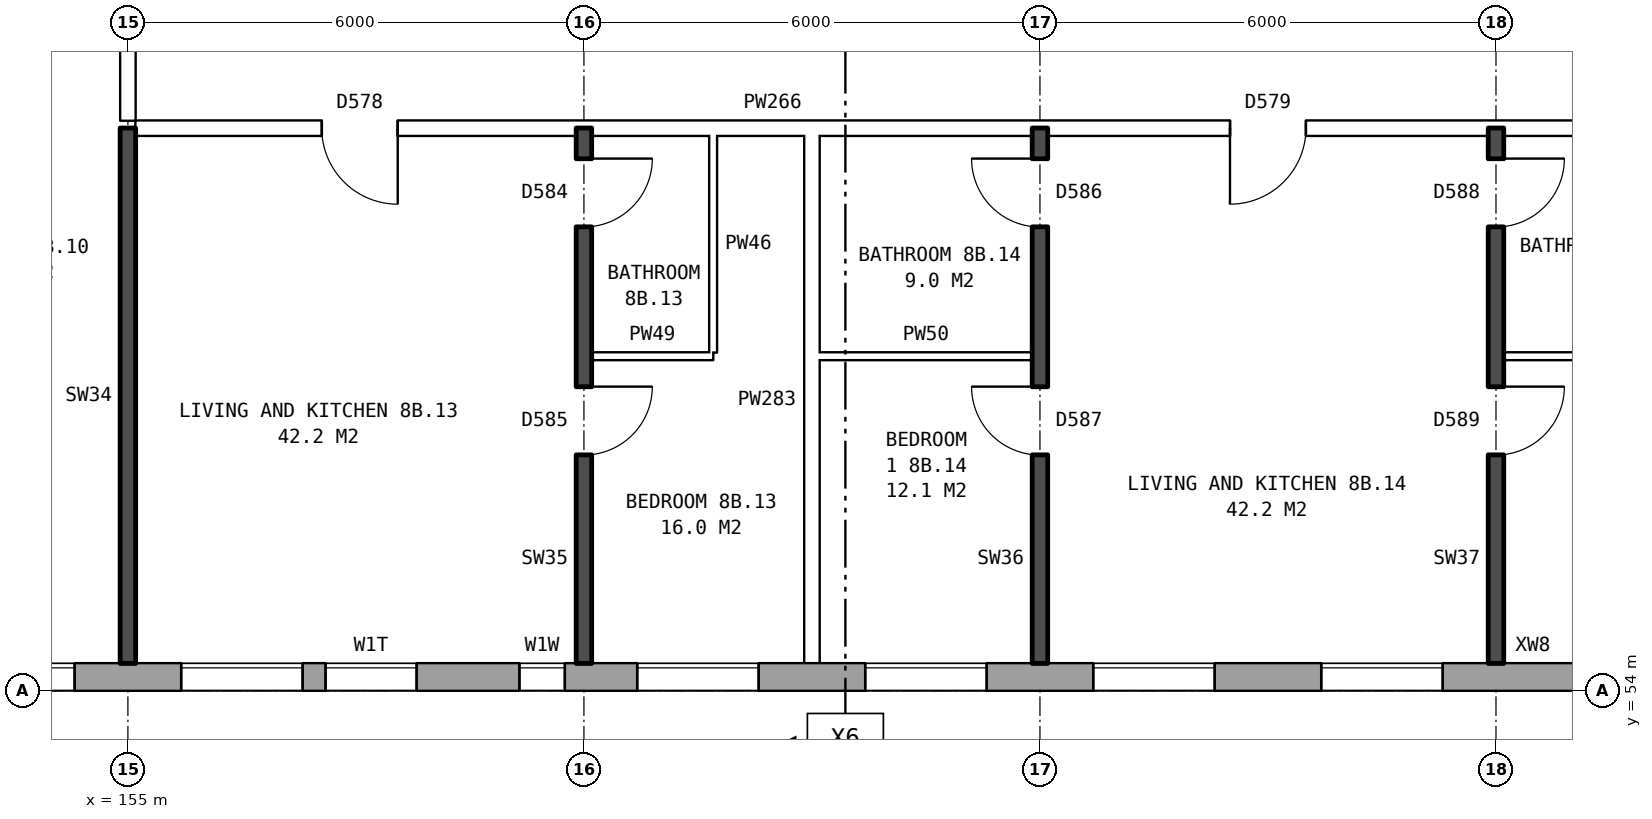
"""IFC4 building model, lengths in metres.
Left out: names, types, materials, properties, quantities, classifications, styles, units other than length and angle.
Written with IfcOpenShell. Run it as: python <this file> out.ifc"""

import sys

from ifc_helpers import new_model, si_unit, direction, frame, frame_2d, origin, place, context, subcontext, project, spatial, rectangle, extrude, element, fill, save


model = new_model("IFC4")
c1 = context("Model", 3, precision=1e-05, world=origin(), true_north=direction((0.0, 1.0)))
c2 = subcontext(c1, "Body", "Model", "MODEL_VIEW")
j1 = project(units=[si_unit("LENGTHUNIT", "METRE"), si_unit("PLANEANGLEUNIT", "RADIAN")], contexts=[c1])
p1 = place(None, origin())
s1 = spatial("IfcSite", under=j1, at=p1, CompositionType="ELEMENT")
p2 = place(p1, origin())
s2 = spatial("IfcBuilding", under=s1, at=p2, CompositionType="ELEMENT")
p3 = place(p2, frame((0.0, 0.0, 31.9)))
s3 = spatial("IfcBuildingStorey", under=s2, at=p3, CompositionType="ELEMENT", Elevation=31.9)
p4 = place(p3, frame((134.075, 54.18, 0.0), z_axis=(0.0, 0.0, 1.0), x_axis=(1.0, 0.0, 0.0)))
e1 = element("IfcWall", 1, at=p4, inside=s3, PredefinedType="STANDARD", context=c2, shape_type="SweptSolid", body=[
    extrude(rectangle(XDim=40.601, YDim=0.36, at=frame_2d((20.3, 0.0))), origin(), (0.0, 0.0, 1.0), 2.85),
])
p5 = place(p4, frame((0.625, 0.0, 0.8)))
e2 = element("IfcOpeningElement", 2, at=p5, cuts=e1, PredefinedType="OPENING", context=c2, shape_type="SweptSolid", body=[
    extrude(rectangle(XDim=1.6, YDim=1.8, at=frame_2d((0.8, 0.9))), frame((0.0, 0.19, 0.0), z_axis=(0.0, -1.0, 0.0), x_axis=(1.0, 0.0, 0.0)), (0.0, 0.0, 1.0), 0.38),
])
p6 = place(p4, frame((3.625, 0.0, 0.8)))
e3 = element("IfcOpeningElement", 3, at=p6, cuts=e1, PredefinedType="OPENING", context=c2, shape_type="SweptSolid", body=[
    extrude(rectangle(XDim=1.6, YDim=1.8, at=frame_2d((0.8, 0.9))), frame((0.0, 0.19, 0.0), z_axis=(0.0, -1.0, 0.0), x_axis=(1.0, 0.0, 0.0)), (0.0, 0.0, 1.0), 0.38),
])
p7 = place(p4, frame((6.625, 0.0, 0.8)))
e4 = element("IfcOpeningElement", 4, at=p7, cuts=e1, PredefinedType="OPENING", context=c2, shape_type="SweptSolid", body=[
    extrude(rectangle(XDim=1.6, YDim=1.8, at=frame_2d((0.8, 0.9))), frame((0.0, 0.19, 0.0), z_axis=(0.0, -1.0, 0.0), x_axis=(1.0, 0.0, 0.0)), (0.0, 0.0, 1.0), 0.38),
])
p8 = place(p4, frame((9.625, 0.0, 0.8)))
e5 = element("IfcOpeningElement", 5, at=p8, cuts=e1, PredefinedType="OPENING", context=c2, shape_type="SweptSolid", body=[
    extrude(rectangle(XDim=1.6, YDim=1.8, at=frame_2d((0.8, 0.9))), frame((0.0, 0.19, 0.0), z_axis=(0.0, -1.0, 0.0), x_axis=(1.0, 0.0, 0.0)), (0.0, 0.0, 1.0), 0.38),
])
p9 = place(p4, frame((12.075, 0.0, 0.8)))
e6 = element("IfcOpeningElement", 6, at=p9, cuts=e1, PredefinedType="OPENING", context=c2, shape_type="SweptSolid", body=[
    extrude(rectangle(XDim=1.2, YDim=1.8, at=frame_2d((0.6, 0.9))), frame((0.0, 0.19, 0.0), z_axis=(0.0, -1.0, 0.0), x_axis=(1.0, 0.0, 0.0)), (0.0, 0.0, 1.0), 0.38),
])
p10 = place(p4, frame((15.575, 0.0, 0.65)))
e7 = element("IfcOpeningElement", 7, at=p10, cuts=e1, PredefinedType="OPENING", context=c2, shape_type="SweptSolid", body=[
    extrude(rectangle(XDim=0.8, YDim=0.9, at=frame_2d((0.4, 0.45))), frame((0.0, 0.19, 0.0), z_axis=(0.0, -1.0, 0.0), x_axis=(1.0, 0.0, 0.0)), (0.0, 0.0, 1.0), 0.38),
])
p11 = place(p4, frame((18.625, 0.0, 0.8)))
e8 = element("IfcOpeningElement", 8, at=p11, cuts=e1, PredefinedType="OPENING", context=c2, shape_type="SweptSolid", body=[
    extrude(rectangle(XDim=1.6, YDim=1.8, at=frame_2d((0.8, 0.9))), frame((0.0, 0.19, 0.0), z_axis=(0.0, -1.0, 0.0), x_axis=(1.0, 0.0, 0.0)), (0.0, 0.0, 1.0), 0.38),
])
p12 = place(p4, frame((21.625, 0.0, 0.8)))
e9 = element("IfcOpeningElement", 9, at=p12, cuts=e1, PredefinedType="OPENING", context=c2, shape_type="SweptSolid", body=[
    extrude(rectangle(XDim=1.6, YDim=1.8, at=frame_2d((0.8, 0.9))), frame((0.0, 0.19, 0.0), z_axis=(0.0, -1.0, 0.0), x_axis=(1.0, 0.0, 0.0)), (0.0, 0.0, 1.0), 0.38),
])
p13 = place(p4, frame((23.525, 0.0, 0.8)))
e10 = element("IfcOpeningElement", 10, at=p13, cuts=e1, PredefinedType="OPENING", context=c2, shape_type="SweptSolid", body=[
    extrude(rectangle(XDim=1.2, YDim=0.9, at=frame_2d((0.6, 0.45))), frame((0.0, 0.19, 0.0), z_axis=(0.0, -1.0, 0.0), x_axis=(1.0, 0.0, 0.0)), (0.0, 0.0, 1.0), 0.38),
])
p14 = place(p4, frame((27.625, 0.0, 0.8)))
e11 = element("IfcOpeningElement", 11, at=p14, cuts=e1, PredefinedType="OPENING", context=c2, shape_type="SweptSolid", body=[
    extrude(rectangle(XDim=1.6, YDim=1.8, at=frame_2d((0.8, 0.9))), frame((0.0, 0.19, 0.0), z_axis=(0.0, -1.0, 0.0), x_axis=(1.0, 0.0, 0.0)), (0.0, 0.0, 1.0), 0.38),
])
p15 = place(p4, frame((30.625, 0.0, 0.8)))
e12 = element("IfcOpeningElement", 12, at=p15, cuts=e1, PredefinedType="OPENING", context=c2, shape_type="SweptSolid", body=[
    extrude(rectangle(XDim=1.6, YDim=1.8, at=frame_2d((0.8, 0.9))), frame((0.0, 0.19, 0.0), z_axis=(0.0, -1.0, 0.0), x_axis=(1.0, 0.0, 0.0)), (0.0, 0.0, 1.0), 0.38),
])
p16 = place(p4, frame((33.625, 0.0, 0.8)))
e13 = element("IfcOpeningElement", 13, at=p16, cuts=e1, PredefinedType="OPENING", context=c2, shape_type="SweptSolid", body=[
    extrude(rectangle(XDim=1.6, YDim=1.8, at=frame_2d((0.8, 0.9))), frame((0.0, 0.19, 0.0), z_axis=(0.0, -1.0, 0.0), x_axis=(1.0, 0.0, 0.0)), (0.0, 0.0, 1.0), 0.38),
])
p17 = place(p4, frame((36.625, 0.0, 0.8)))
e14 = element("IfcOpeningElement", 14, at=p17, cuts=e1, PredefinedType="OPENING", context=c2, shape_type="SweptSolid", body=[
    extrude(rectangle(XDim=1.6, YDim=1.8, at=frame_2d((0.8, 0.9))), frame((0.0, 0.19, 0.0), z_axis=(0.0, -1.0, 0.0), x_axis=(1.0, 0.0, 0.0)), (0.0, 0.0, 1.0), 0.38),
])
p18 = place(p4, frame((13.575, 0.0, 1.4)))
e15 = element("IfcOpeningElement", 15, at=p18, cuts=e1, PredefinedType="OPENING", context=c2, shape_type="SweptSolid", body=[
    extrude(rectangle(XDim=0.6, YDim=1.2, at=frame_2d((0.3, 0.6))), frame((0.0, 0.19, 0.0), z_axis=(0.0, -1.0, 0.0), x_axis=(1.0, 0.0, 0.0)), (0.0, 0.0, 1.0), 0.38),
])
p19 = place(p4, frame((16.725, 0.0, 0.65)))
e16 = element("IfcOpeningElement", 16, at=p19, cuts=e1, PredefinedType="OPENING", context=c2, shape_type="SweptSolid", body=[
    extrude(rectangle(XDim=1.0, YDim=1.8, at=frame_2d((0.5, 0.9))), frame((0.0, 0.19, 0.0), z_axis=(0.0, -1.0, 0.0), x_axis=(1.0, 0.0, 0.0)), (0.0, 0.0, 1.0), 0.38),
])
p20 = place(p4, frame((26.075, 0.0, 1.7)))
e17 = element("IfcOpeningElement", 17, at=p20, cuts=e1, PredefinedType="OPENING", context=c2, shape_type="SweptSolid", body=[
    extrude(rectangle(XDim=0.6, YDim=0.9, at=frame_2d((0.3, 0.45))), frame((0.0, 0.19, 0.0), z_axis=(0.0, -1.0, 0.0), x_axis=(1.0, 0.0, 0.0)), (0.0, 0.0, 1.0), 0.38),
])
p21 = place(p3, frame((161.1, 58.4, 0.0), z_axis=(0.0, 0.0, 1.0), x_axis=(1.0, 0.0, 0.0)))
e18 = element("IfcWall", 18, at=p21, inside=s3, PredefinedType="PARTITIONING", context=c2, shape_type="SweptSolid", body=[
    extrude(rectangle(XDim=1.6, YDim=0.1, at=frame_2d((0.8, 0.0))), origin(), (0.0, 0.0, 1.0), 2.85),
])
p22 = place(p3, frame((164.1, 58.4, 0.0), z_axis=(0.0, 0.0, 1.0), x_axis=(1.0, 0.0, 0.0)))
e19 = element("IfcWall", 19, at=p22, inside=s3, PredefinedType="PARTITIONING", context=c2, shape_type="SweptSolid", body=[
    extrude(rectangle(XDim=2.8, YDim=0.1, at=frame_2d((1.4, 0.0))), origin(), (0.0, 0.0, 1.0), 2.85),
])
p23 = place(p3, frame((173.1, 58.4, 0.0), z_axis=(0.0, 0.0, 1.0), x_axis=(1.0, 0.0, 0.0)))
e20 = element("IfcWall", 20, at=p23, inside=s3, PredefinedType="PARTITIONING", context=c2, shape_type="SweptSolid", body=[
    extrude(rectangle(XDim=2.9, YDim=0.1, at=frame_2d((1.45, 0.0))), origin(), (0.0, 0.0, 1.0), 2.85),
])
p24 = place(p3, frame((155.1, 61.4, 0.0), z_axis=(0.0, 0.0, 1.0), x_axis=(1.0, 0.0, 0.0)))
e21 = element("IfcWall", 21, at=p24, inside=s3, PredefinedType="PARTITIONING", context=c2, shape_type="SweptSolid", body=[
    extrude(rectangle(XDim=22.29, YDim=0.2, at=frame_2d((11.145, 0.0))), origin(), (0.0, 0.0, 1.0), 2.85),
])
p25 = place(p24, frame((2.45, 0.0, 0.0)))
e22 = element("IfcOpeningElement", 22, at=p25, cuts=e21, PredefinedType="OPENING", context=c2, shape_type="SweptSolid", body=[
    extrude(rectangle(XDim=1.0, YDim=2.1, at=frame_2d((0.5, 1.05))), frame((0.0, 0.11, 0.0), z_axis=(0.0, -1.0, 0.0), x_axis=(1.0, 0.0, 0.0)), (0.0, 0.0, 1.0), 0.22),
])
p26 = place(p24, frame((14.4, 0.0, 0.0)))
e23 = element("IfcOpeningElement", 23, at=p26, cuts=e21, PredefinedType="OPENING", context=c2, shape_type="SweptSolid", body=[
    extrude(rectangle(XDim=1.0, YDim=2.1, at=frame_2d((0.5, 1.05))), frame((0.0, 0.11, 0.0), z_axis=(0.0, -1.0, 0.0), x_axis=(1.0, 0.0, 0.0)), (0.0, 0.0, 1.0), 0.22),
])
p27 = place(p3, frame((155.0, 54.36, 0.0), z_axis=(0.0, 0.0, 1.0), x_axis=(0.0, 1.0, 0.0)))
e24 = element("IfcWall", 24, at=p27, inside=s3, PredefinedType="SOLIDWALL", context=c2, shape_type="SweptSolid", body=[
    extrude(rectangle(XDim=7.04, YDim=0.2, at=frame_2d((3.52, 0.0))), origin(), (0.0, 0.0, 1.0), 2.85),
])
p28 = place(p3, frame((155.0, 61.5, 0.0), z_axis=(0.0, 0.0, 1.0), x_axis=(0.0, 1.0, 0.0)))
e25 = element("IfcWall", 25, at=p28, inside=s3, PredefinedType="PARTITIONING", context=c2, shape_type="SweptSolid", body=[
    extrude(rectangle(XDim=2.2, YDim=0.2, at=frame_2d((1.1, 0.0))), origin(), (0.0, 0.0, 1.0), 2.85),
])
p29 = place(p3, frame((161.0, 54.36, 0.0), z_axis=(0.0, 0.0, 1.0), x_axis=(0.0, 1.0, 0.0)))
e26 = element("IfcWall", 26, at=p29, inside=s3, PredefinedType="SOLIDWALL", context=c2, shape_type="SweptSolid", body=[
    extrude(rectangle(XDim=7.04, YDim=0.2, at=frame_2d((3.52, 0.0))), origin(), (0.0, 0.0, 1.0), 2.85),
])
p30 = place(p29, frame((2.74, 0.0, 0.0)))
e27 = element("IfcOpeningElement", 27, at=p30, cuts=e26, PredefinedType="OPENING", context=c2, shape_type="SweptSolid", body=[
    extrude(rectangle(XDim=0.9, YDim=2.1, at=frame_2d((0.45, 1.05))), frame((0.0, 0.11, 0.0), z_axis=(0.0, -1.0, 0.0), x_axis=(1.0, 0.0, 0.0)), (0.0, 0.0, 1.0), 0.22),
])
p31 = place(p29, frame((5.74, 0.0, 0.0)))
e28 = element("IfcOpeningElement", 28, at=p31, cuts=e26, PredefinedType="OPENING", context=c2, shape_type="SweptSolid", body=[
    extrude(rectangle(XDim=0.9, YDim=2.1, at=frame_2d((0.45, 1.05))), frame((0.0, 0.11, 0.0), z_axis=(0.0, -1.0, 0.0), x_axis=(1.0, 0.0, 0.0)), (0.0, 0.0, 1.0), 0.22),
])
p32 = place(p3, frame((162.7, 58.45, 0.0), z_axis=(0.0, 0.0, 1.0), x_axis=(0.0, 1.0, 0.0)))
e29 = element("IfcWall", 29, at=p32, inside=s3, PredefinedType="PARTITIONING", context=c2, shape_type="SweptSolid", body=[
    extrude(rectangle(XDim=2.85, YDim=0.1, at=frame_2d((1.425, 0.0))), origin(), (0.0, 0.0, 1.0), 2.85),
])
p33 = place(p3, frame((164.0, 54.36, 0.0), z_axis=(0.0, 0.0, 1.0), x_axis=(0.0, 1.0, 0.0)))
e30 = element("IfcWall", 30, at=p33, inside=s3, PredefinedType="PARTITIONING", context=c2, shape_type="SweptSolid", body=[
    extrude(rectangle(XDim=6.94, YDim=0.2, at=frame_2d((3.47, 0.0))), origin(), (0.0, 0.0, 1.0), 2.85),
])
p34 = place(p3, frame((167.0, 54.36, 0.0), z_axis=(0.0, 0.0, 1.0), x_axis=(0.0, 1.0, 0.0)))
e31 = element("IfcWall", 31, at=p34, inside=s3, PredefinedType="SOLIDWALL", context=c2, shape_type="SweptSolid", body=[
    extrude(rectangle(XDim=7.04, YDim=0.2, at=frame_2d((3.52, 0.0))), origin(), (0.0, 0.0, 1.0), 2.85),
])
p35 = place(p34, frame((2.74, 0.0, 0.0)))
e32 = element("IfcOpeningElement", 32, at=p35, cuts=e31, PredefinedType="OPENING", context=c2, shape_type="SweptSolid", body=[
    extrude(rectangle(XDim=0.9, YDim=2.1, at=frame_2d((0.45, 1.05))), frame((0.0, 0.11, 0.0), z_axis=(0.0, -1.0, 0.0), x_axis=(1.0, 0.0, 0.0)), (0.0, 0.0, 1.0), 0.22),
])
p36 = place(p34, frame((5.74, 0.0, 0.0)))
e33 = element("IfcOpeningElement", 33, at=p36, cuts=e31, PredefinedType="OPENING", context=c2, shape_type="SweptSolid", body=[
    extrude(rectangle(XDim=0.9, YDim=2.1, at=frame_2d((0.45, 1.05))), frame((0.0, 0.11, 0.0), z_axis=(0.0, -1.0, 0.0), x_axis=(1.0, 0.0, 0.0)), (0.0, 0.0, 1.0), 0.22),
])
p37 = place(p3, frame((173.0, 54.36, 0.0), z_axis=(0.0, 0.0, 1.0), x_axis=(0.0, 1.0, 0.0)))
e34 = element("IfcWall", 34, at=p37, inside=s3, PredefinedType="SOLIDWALL", context=c2, shape_type="SweptSolid", body=[
    extrude(rectangle(XDim=7.04, YDim=0.2, at=frame_2d((3.52, 0.0))), origin(), (0.0, 0.0, 1.0), 2.85),
])
p38 = place(p37, frame((2.74, 0.0, 0.0)))
e35 = element("IfcOpeningElement", 35, at=p38, cuts=e34, PredefinedType="OPENING", context=c2, shape_type="SweptSolid", body=[
    extrude(rectangle(XDim=0.9, YDim=2.1, at=frame_2d((0.45, 1.05))), frame((0.0, 0.11, 0.0), z_axis=(0.0, -1.0, 0.0), x_axis=(1.0, 0.0, 0.0)), (0.0, 0.0, 1.0), 0.22),
])
p39 = place(p37, frame((5.74, 0.0, 0.0)))
e36 = element("IfcOpeningElement", 36, at=p39, cuts=e34, PredefinedType="OPENING", context=c2, shape_type="SweptSolid", body=[
    extrude(rectangle(XDim=0.9, YDim=2.1, at=frame_2d((0.45, 1.05))), frame((0.0, 0.11, 0.0), z_axis=(0.0, -1.0, 0.0), x_axis=(1.0, 0.0, 0.0)), (0.0, 0.0, 1.0), 0.22),
])
p40 = place(p11, origin())
e37 = element("IfcWindow", 37, at=p40, inside=s3, PartitioningType="SINGLE_PANEL", PredefinedType="WINDOW", context=c2, shape_type="SweptSolid", body=[
    extrude(rectangle(XDim=1.6, YDim=1.8, at=frame_2d((0.8, 0.9))), frame((0.0, 0.15, 0.0), z_axis=(0.0, -1.0, 0.0), x_axis=(1.0, 0.0, 0.0)), (0.0, 0.0, 1.0), 0.06),
])
fill(e8, e37)
p41 = place(p12, origin())
e38 = element("IfcWindow", 38, at=p41, inside=s3, PartitioningType="SINGLE_PANEL", PredefinedType="WINDOW", context=c2, shape_type="SweptSolid", body=[
    extrude(rectangle(XDim=1.6, YDim=1.8, at=frame_2d((0.8, 0.9))), frame((0.0, 0.15, 0.0), z_axis=(0.0, -1.0, 0.0), x_axis=(1.0, 0.0, 0.0)), (0.0, 0.0, 1.0), 0.06),
])
fill(e9, e38)
p42 = place(p13, origin())
e39 = element("IfcWindow", 39, at=p42, inside=s3, PartitioningType="SINGLE_PANEL", PredefinedType="WINDOW", context=c2, shape_type="SweptSolid", body=[
    extrude(rectangle(XDim=1.2, YDim=0.9, at=frame_2d((0.6, 0.45))), frame((0.0, 0.15, 0.0), z_axis=(0.0, -1.0, 0.0), x_axis=(1.0, 0.0, 0.0)), (0.0, 0.0, 1.0), 0.06),
])
fill(e10, e39)
p43 = place(p14, origin())
e40 = element("IfcWindow", 40, at=p43, inside=s3, PartitioningType="SINGLE_PANEL", PredefinedType="WINDOW", context=c2, shape_type="SweptSolid", body=[
    extrude(rectangle(XDim=1.6, YDim=1.8, at=frame_2d((0.8, 0.9))), frame((0.0, 0.15, 0.0), z_axis=(0.0, -1.0, 0.0), x_axis=(1.0, 0.0, 0.0)), (0.0, 0.0, 1.0), 0.06),
])
fill(e11, e40)
p44 = place(p15, origin())
e41 = element("IfcWindow", 41, at=p44, inside=s3, PartitioningType="SINGLE_PANEL", PredefinedType="WINDOW", context=c2, shape_type="SweptSolid", body=[
    extrude(rectangle(XDim=1.6, YDim=1.8, at=frame_2d((0.8, 0.9))), frame((0.0, 0.15, 0.0), z_axis=(0.0, -1.0, 0.0), x_axis=(1.0, 0.0, 0.0)), (0.0, 0.0, 1.0), 0.06),
])
fill(e12, e41)
p45 = place(p16, origin())
e42 = element("IfcWindow", 42, at=p45, inside=s3, PartitioningType="SINGLE_PANEL", PredefinedType="WINDOW", context=c2, shape_type="SweptSolid", body=[
    extrude(rectangle(XDim=1.6, YDim=1.8, at=frame_2d((0.8, 0.9))), frame((0.0, 0.15, 0.0), z_axis=(0.0, -1.0, 0.0), x_axis=(1.0, 0.0, 0.0)), (0.0, 0.0, 1.0), 0.06),
])
fill(e13, e42)
p46 = place(p17, origin())
e43 = element("IfcWindow", 43, at=p46, inside=s3, PartitioningType="SINGLE_PANEL", PredefinedType="WINDOW", context=c2, shape_type="SweptSolid", body=[
    extrude(rectangle(XDim=1.6, YDim=1.8, at=frame_2d((0.8, 0.9))), frame((0.0, 0.15, 0.0), z_axis=(0.0, -1.0, 0.0), x_axis=(1.0, 0.0, 0.0)), (0.0, 0.0, 1.0), 0.06),
])
fill(e14, e43)
p47 = place(p30, frame((0.9, 0.0, 0.0), z_axis=(0.0, 0.0, 1.0), x_axis=(-1.0, 0.0, 0.0)))
e44 = element("IfcDoor", 44, at=p47, inside=s3, OperationType="SINGLE_SWING_LEFT", PredefinedType="DOOR", context=c2, shape_type="SweptSolid", body=[
    extrude(rectangle(XDim=0.9, YDim=2.1, at=frame_2d((0.45, 1.05))), frame((0.0, 0.025, 0.0), z_axis=(0.0, -1.0, 0.0), x_axis=(1.0, 0.0, 0.0)), (0.0, 0.0, 1.0), 0.05),
])
fill(e27, e44)
p48 = place(p25, frame((1.0, 0.0, 0.0), z_axis=(0.0, 0.0, 1.0), x_axis=(-1.0, 0.0, 0.0)))
e45 = element("IfcDoor", 45, at=p48, inside=s3, OperationType="SINGLE_SWING_LEFT", PredefinedType="DOOR", context=c2, shape_type="SweptSolid", body=[
    extrude(rectangle(XDim=1.0, YDim=2.1, at=frame_2d((0.5, 1.05))), frame((0.0, 0.025, 0.0), z_axis=(0.0, -1.0, 0.0), x_axis=(1.0, 0.0, 0.0)), (0.0, 0.0, 1.0), 0.05),
])
fill(e22, e45)
p49 = place(p31, frame((0.9, 0.0, 0.0), z_axis=(0.0, 0.0, 1.0), x_axis=(-1.0, 0.0, 0.0)))
e46 = element("IfcDoor", 46, at=p49, inside=s3, OperationType="SINGLE_SWING_LEFT", PredefinedType="DOOR", context=c2, shape_type="SweptSolid", body=[
    extrude(rectangle(XDim=0.9, YDim=2.1, at=frame_2d((0.45, 1.05))), frame((0.0, 0.025, 0.0), z_axis=(0.0, -1.0, 0.0), x_axis=(1.0, 0.0, 0.0)), (0.0, 0.0, 1.0), 0.05),
])
fill(e28, e46)
p50 = place(p35, origin())
e47 = element("IfcDoor", 47, at=p50, inside=s3, OperationType="SINGLE_SWING_RIGHT", PredefinedType="DOOR", context=c2, shape_type="SweptSolid", body=[
    extrude(rectangle(XDim=0.9, YDim=2.1, at=frame_2d((0.45, 1.05))), frame((0.0, 0.025, 0.0), z_axis=(0.0, -1.0, 0.0), x_axis=(1.0, 0.0, 0.0)), (0.0, 0.0, 1.0), 0.05),
])
fill(e32, e47)
p51 = place(p38, frame((0.9, 0.0, 0.0), z_axis=(0.0, 0.0, 1.0), x_axis=(-1.0, 0.0, 0.0)))
e48 = element("IfcDoor", 48, at=p51, inside=s3, OperationType="SINGLE_SWING_LEFT", PredefinedType="DOOR", context=c2, shape_type="SweptSolid", body=[
    extrude(rectangle(XDim=0.9, YDim=2.1, at=frame_2d((0.45, 1.05))), frame((0.0, 0.025, 0.0), z_axis=(0.0, -1.0, 0.0), x_axis=(1.0, 0.0, 0.0)), (0.0, 0.0, 1.0), 0.05),
])
fill(e35, e48)
p52 = place(p26, frame((1.0, 0.0, 0.0), z_axis=(0.0, 0.0, 1.0), x_axis=(-1.0, 0.0, 0.0)))
e49 = element("IfcDoor", 49, at=p52, inside=s3, OperationType="SINGLE_SWING_RIGHT", PredefinedType="DOOR", context=c2, shape_type="SweptSolid", body=[
    extrude(rectangle(XDim=1.0, YDim=2.1, at=frame_2d((0.5, 1.05))), frame((0.0, 0.025, 0.0), z_axis=(0.0, -1.0, 0.0), x_axis=(1.0, 0.0, 0.0)), (0.0, 0.0, 1.0), 0.05),
])
fill(e23, e49)
p53 = place(p36, origin())
e50 = element("IfcDoor", 50, at=p53, inside=s3, OperationType="SINGLE_SWING_RIGHT", PredefinedType="DOOR", context=c2, shape_type="SweptSolid", body=[
    extrude(rectangle(XDim=0.9, YDim=2.1, at=frame_2d((0.45, 1.05))), frame((0.0, 0.025, 0.0), z_axis=(0.0, -1.0, 0.0), x_axis=(1.0, 0.0, 0.0)), (0.0, 0.0, 1.0), 0.05),
])
fill(e33, e50)
p54 = place(p39, frame((0.9, 0.0, 0.0), z_axis=(0.0, 0.0, 1.0), x_axis=(-1.0, 0.0, 0.0)))
e51 = element("IfcDoor", 51, at=p54, inside=s3, OperationType="SINGLE_SWING_LEFT", PredefinedType="DOOR", context=c2, shape_type="SweptSolid", body=[
    extrude(rectangle(XDim=0.9, YDim=2.1, at=frame_2d((0.45, 1.05))), frame((0.0, 0.025, 0.0), z_axis=(0.0, -1.0, 0.0), x_axis=(1.0, 0.0, 0.0)), (0.0, 0.0, 1.0), 0.05),
])
fill(e36, e51)
p55 = place(p20, origin())
e52 = element("IfcWindow", 52, at=p55, inside=s3, PartitioningType="SINGLE_PANEL", PredefinedType="WINDOW", context=c2, shape_type="SweptSolid", body=[
    extrude(rectangle(XDim=0.6, YDim=0.9, at=frame_2d((0.3, 0.45))), frame((0.0, 0.15, 0.0), z_axis=(0.0, -1.0, 0.0), x_axis=(1.0, 0.0, 0.0)), (0.0, 0.0, 1.0), 0.06),
])
fill(e17, e52)
save(model, sys.argv[1])
